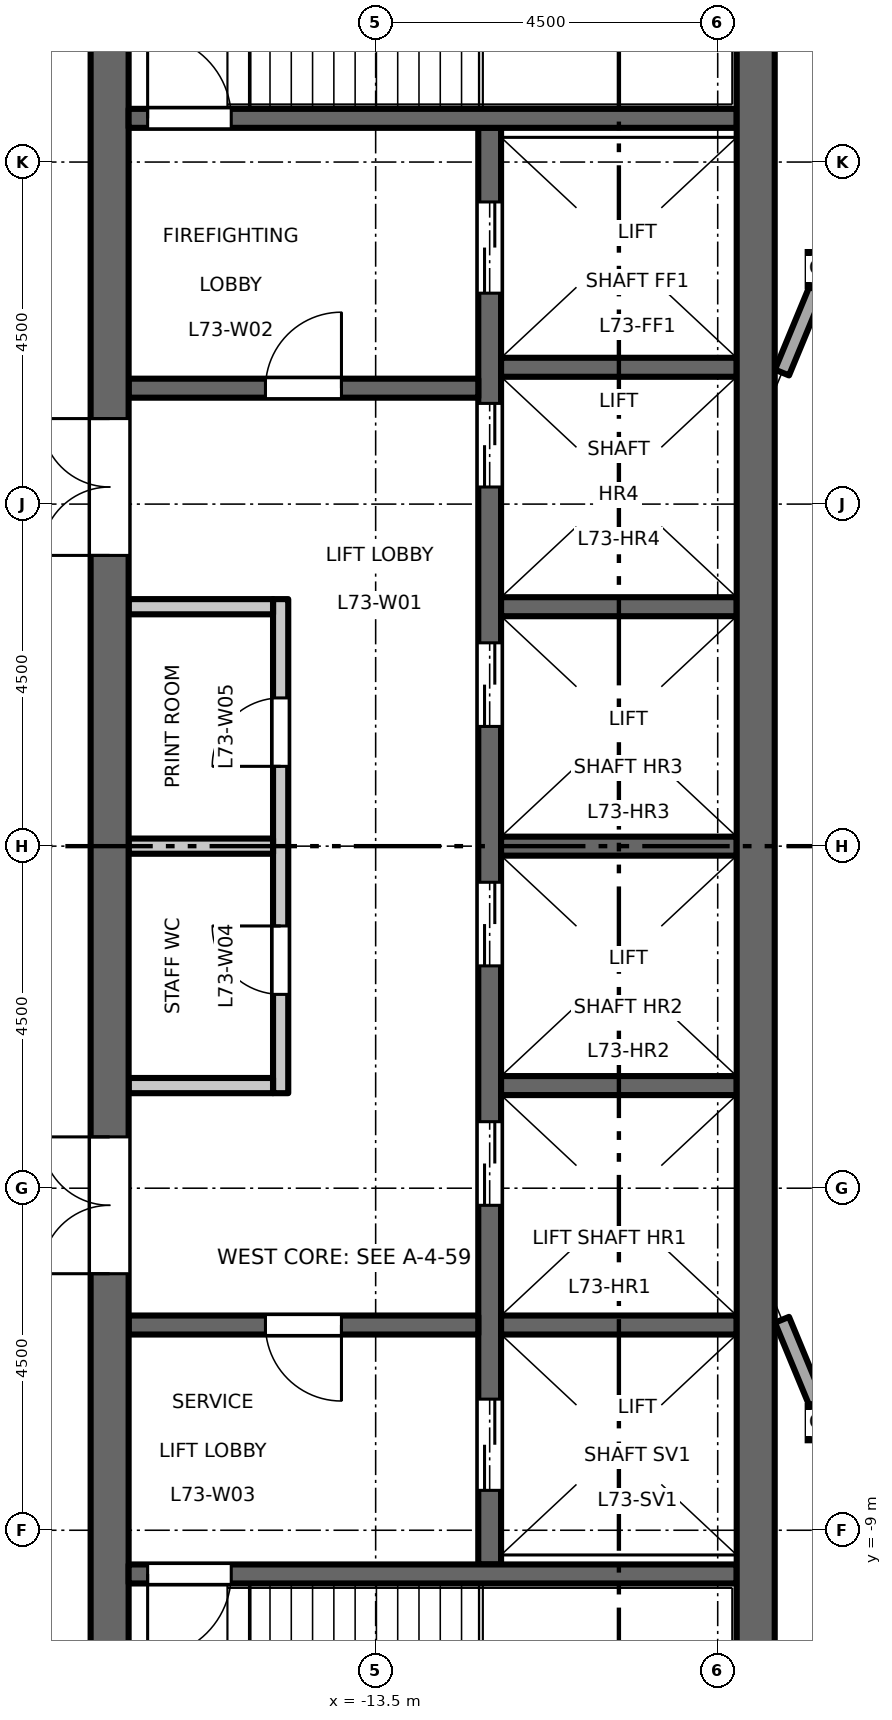
"""IFC4 building model, lengths in metres.
Left out: names, types, materials, properties, quantities, classifications, styles, units other than length and angle.
Written with IfcOpenShell. Run it as: python <this file> out.ifc"""

import sys

from ifc_helpers import new_model, si_unit, direction, frame, frame_2d, origin, origin_2d, place, context, subcontext, project, spatial, rectangle, hollow_rectangle, extrude, element, fill, save


model = new_model("IFC4")
c1 = context("Model", 3, precision=1e-05, world=origin(), true_north=direction((0.0, 1.0)))
c2 = subcontext(c1, "Body", "Model", "MODEL_VIEW")
j1 = project(units=[si_unit("LENGTHUNIT", "METRE"), si_unit("PLANEANGLEUNIT", "RADIAN")], contexts=[c1])
p1 = place(None, origin())
s1 = spatial("IfcSite", under=j1, at=p1, CompositionType="ELEMENT")
p2 = place(p1, origin())
s2 = spatial("IfcBuilding", under=s1, at=p2, CompositionType="ELEMENT")
p3 = place(p2, frame((0.0, 0.0, 339.2)))
s3 = spatial("IfcBuildingStorey", under=s2, at=p3, CompositionType="ELEMENT", Elevation=339.2)
for number, where, z_axis, x_axis in (
    (1, (-7.591, -7.591, 0.0), (0.0, 0.0, 1.0), (1.0, 0.0, 0.0)),
    (2, (-7.591, 7.591, 0.0), (0.0, 0.0, 1.0), (1.0, 0.0, 0.0)),
):
    element("IfcColumn", number, at=place(p3, frame(where, z_axis=z_axis, x_axis=x_axis)), inside=s3, PredefinedType="COLUMN", context=c2, shape_type="SweptSolid", body=[
        extrude(hollow_rectangle(XDim=0.45, YDim=0.45, WallThickness=0.022, at=origin_2d()), origin(), (0.0, 0.0, 1.0), 4.5),
    ])
p4 = place(p3, frame((-14.75, -3.25, 0.0), z_axis=(0.0, 0.0, 1.0), x_axis=(0.0, 1.0, 0.0)))
e3 = element("IfcWall", 3, at=p4, inside=s3, PredefinedType="PARTITIONING", context=c2, shape_type="SweptSolid", body=[
    extrude(rectangle(XDim=6.5, YDim=0.2, at=frame_2d((3.25, 0.0))), origin(), (0.0, 0.0, 1.0), 4.35),
])
p5 = place(p4, frame((1.3, 0.0, 0.0)))
e4 = element("IfcOpeningElement", 4, at=p5, cuts=e3, PredefinedType="OPENING", context=c2, shape_type="SweptSolid", body=[
    extrude(rectangle(XDim=0.9, YDim=2.1, at=frame_2d((0.45, 1.05))), frame((0.0, 0.11, 0.0), z_axis=(0.0, -1.0, 0.0), x_axis=(1.0, 0.0, 0.0)), (0.0, 0.0, 1.0), 0.22),
])
p6 = place(p4, frame((4.3, 0.0, 0.0)))
e5 = element("IfcOpeningElement", 5, at=p6, cuts=e3, PredefinedType="OPENING", context=c2, shape_type="SweptSolid", body=[
    extrude(rectangle(XDim=0.9, YDim=2.1, at=frame_2d((0.45, 1.05))), frame((0.0, 0.11, 0.0), z_axis=(0.0, -1.0, 0.0), x_axis=(1.0, 0.0, 0.0)), (0.0, 0.0, 1.0), 0.22),
])
for number, where, z_axis, x_axis in (
    (6, (-14.85, 3.15, 0.0), (0.0, 0.0, 1.0), (-1.0, 0.0, 0.0)),
    (7, (-14.85, -3.15, 0.0), (0.0, 0.0, 1.0), (-1.0, 0.0, 0.0)),
    (8, (-14.85, 0.0, 0.0), (0.0, 0.0, 1.0), (-1.0, 0.0, 0.0)),
):
    element("IfcWall", number, at=place(p3, frame(where, z_axis=z_axis, x_axis=x_axis)), inside=s3, PredefinedType="PARTITIONING", context=c2, shape_type="SweptSolid", body=[
        extrude(rectangle(XDim=1.9, YDim=0.2, at=frame_2d((0.95, 0.0))), origin(), (0.0, 0.0, 1.0), 4.35),
    ])
p7 = place(p3, frame((-12.0, -9.45, 0.0), z_axis=(0.0, 0.0, 1.0), x_axis=(0.0, 1.0, 0.0)))
e9 = element("IfcWall", 9, at=p7, inside=s3, PredefinedType="SHEAR", context=c2, shape_type="SweptSolid", body=[
    extrude(rectangle(XDim=18.9, YDim=0.3, at=frame_2d((9.45, 0.0))), origin(), (0.0, 0.0, 1.0), 4.35),
])
p8 = place(p7, frame((4.725, 0.0, 0.0)))
e10 = element("IfcOpeningElement", 10, at=p8, cuts=e9, PredefinedType="OPENING", context=c2, shape_type="SweptSolid", body=[
    extrude(rectangle(XDim=1.1, YDim=2.1, at=frame_2d((0.55, 1.05))), frame((0.0, 0.16, 0.0), z_axis=(0.0, -1.0, 0.0), x_axis=(1.0, 0.0, 0.0)), (0.0, 0.0, 1.0), 0.32),
])
p9 = place(p7, frame((7.875, 0.0, 0.0)))
e11 = element("IfcOpeningElement", 11, at=p9, cuts=e9, PredefinedType="OPENING", context=c2, shape_type="SweptSolid", body=[
    extrude(rectangle(XDim=1.1, YDim=2.1, at=frame_2d((0.55, 1.05))), frame((0.0, 0.16, 0.0), z_axis=(0.0, -1.0, 0.0), x_axis=(1.0, 0.0, 0.0)), (0.0, 0.0, 1.0), 0.32),
])
p10 = place(p7, frame((11.025, 0.0, 0.0)))
e12 = element("IfcOpeningElement", 12, at=p10, cuts=e9, PredefinedType="OPENING", context=c2, shape_type="SweptSolid", body=[
    extrude(rectangle(XDim=1.1, YDim=2.1, at=frame_2d((0.55, 1.05))), frame((0.0, 0.16, 0.0), z_axis=(0.0, -1.0, 0.0), x_axis=(1.0, 0.0, 0.0)), (0.0, 0.0, 1.0), 0.32),
])
p11 = place(p7, frame((14.175, 0.0, 0.0)))
e13 = element("IfcOpeningElement", 13, at=p11, cuts=e9, PredefinedType="OPENING", context=c2, shape_type="SweptSolid", body=[
    extrude(rectangle(XDim=1.1, YDim=2.1, at=frame_2d((0.55, 1.05))), frame((0.0, 0.16, 0.0), z_axis=(0.0, -1.0, 0.0), x_axis=(1.0, 0.0, 0.0)), (0.0, 0.0, 1.0), 0.32),
])
p12 = place(p7, frame((16.725, 0.0, 0.0)))
e14 = element("IfcOpeningElement", 14, at=p12, cuts=e9, PredefinedType="OPENING", context=c2, shape_type="SweptSolid", body=[
    extrude(rectangle(XDim=1.2, YDim=2.1, at=frame_2d((0.6, 1.05))), frame((0.0, 0.16, 0.0), z_axis=(0.0, -1.0, 0.0), x_axis=(1.0, 0.0, 0.0)), (0.0, 0.0, 1.0), 0.32),
])
p13 = place(p7, frame((0.975, 0.0, 0.0)))
e15 = element("IfcOpeningElement", 15, at=p13, cuts=e9, PredefinedType="OPENING", context=c2, shape_type="SweptSolid", body=[
    extrude(rectangle(XDim=1.2, YDim=2.1, at=frame_2d((0.6, 1.05))), frame((0.0, 0.16, 0.0), z_axis=(0.0, -1.0, 0.0), x_axis=(1.0, 0.0, 0.0)), (0.0, 0.0, 1.0), 0.32),
])
p14 = place(p3, frame((-12.15, 6.025, 0.0), z_axis=(0.0, 0.0, 1.0), x_axis=(-1.0, 0.0, 0.0)))
e16 = element("IfcWall", 16, at=p14, inside=s3, PredefinedType="SHEAR", context=c2, shape_type="SweptSolid", body=[
    extrude(rectangle(XDim=4.6, YDim=0.25, at=frame_2d((2.3, 0.0))), origin(), (0.0, 0.0, 1.0), 4.35),
])
p15 = place(p14, frame((1.8, 0.0, 0.0)))
e17 = element("IfcOpeningElement", 17, at=p15, cuts=e16, PredefinedType="OPENING", context=c2, shape_type="SweptSolid", body=[
    extrude(rectangle(XDim=1.0, YDim=2.1, at=frame_2d((0.5, 1.05))), frame((0.0, 0.135, 0.0), z_axis=(0.0, -1.0, 0.0), x_axis=(1.0, 0.0, 0.0)), (0.0, 0.0, 1.0), 0.27),
])
p16 = place(p3, frame((-12.15, -6.3, 0.0), z_axis=(0.0, 0.0, 1.0), x_axis=(-1.0, 0.0, 0.0)))
e18 = element("IfcWall", 18, at=p16, inside=s3, PredefinedType="SHEAR", context=c2, shape_type="SweptSolid", body=[
    extrude(rectangle(XDim=4.6, YDim=0.25, at=frame_2d((2.3, 0.0))), origin(), (0.0, 0.0, 1.0), 4.35),
])
p17 = place(p16, frame((1.8, 0.0, 0.0)))
e19 = element("IfcOpeningElement", 19, at=p17, cuts=e18, PredefinedType="OPENING", context=c2, shape_type="SweptSolid", body=[
    extrude(rectangle(XDim=1.0, YDim=2.1, at=frame_2d((0.5, 1.05))), frame((0.0, 0.135, 0.0), z_axis=(0.0, -1.0, 0.0), x_axis=(1.0, 0.0, 0.0)), (0.0, 0.0, 1.0), 0.27),
])
p18 = place(p3, frame((-17.0, -13.0, 0.0), z_axis=(0.0, 0.0, 1.0), x_axis=(0.0, 1.0, 0.0)))
e20 = element("IfcWall", 20, at=p18, inside=s3, PredefinedType="SHEAR", context=c2, shape_type="SweptSolid", body=[
    extrude(rectangle(XDim=26.0, YDim=0.5, at=frame_2d((13.0, 0.0))), origin(), (0.0, 0.0, 1.0), 4.35),
])
p19 = place(p18, frame((16.825, 0.0, 0.0)))
e21 = element("IfcOpeningElement", 21, at=p19, cuts=e20, PredefinedType="OPENING", context=c2, shape_type="SweptSolid", body=[
    extrude(rectangle(XDim=1.8, YDim=2.1, at=frame_2d((0.9, 1.05))), frame((0.0, 0.26, 0.0), z_axis=(0.0, -1.0, 0.0), x_axis=(1.0, 0.0, 0.0)), (0.0, 0.0, 1.0), 0.52),
])
p20 = place(p18, frame((7.375, 0.0, 0.0)))
e22 = element("IfcOpeningElement", 22, at=p20, cuts=e20, PredefinedType="OPENING", context=c2, shape_type="SweptSolid", body=[
    extrude(rectangle(XDim=1.8, YDim=2.1, at=frame_2d((0.9, 1.05))), frame((0.0, 0.26, 0.0), z_axis=(0.0, -1.0, 0.0), x_axis=(1.0, 0.0, 0.0)), (0.0, 0.0, 1.0), 0.52),
])
for number, where, z_axis, x_axis in (
    (23, (-8.75, 0.0, 0.0), (0.0, 0.0, 1.0), (-1.0, 0.0, 0.0)),
    (24, (-8.75, 3.15, 0.0), (0.0, 0.0, 1.0), (-1.0, 0.0, 0.0)),
    (25, (-8.75, 6.3, 0.0), (0.0, 0.0, 1.0), (-1.0, 0.0, 0.0)),
    (26, (-8.75, -3.15, 0.0), (0.0, 0.0, 1.0), (-1.0, 0.0, 0.0)),
    (27, (-8.75, -6.3, 0.0), (0.0, 0.0, 1.0), (-1.0, 0.0, 0.0)),
):
    element("IfcWall", number, at=place(p3, frame(where, z_axis=z_axis, x_axis=x_axis)), inside=s3, PredefinedType="SHEAR", context=c2, shape_type="SweptSolid", body=[
        extrude(rectangle(XDim=3.1, YDim=0.25, at=frame_2d((1.55, 0.0))), origin(), (0.0, 0.0, 1.0), 4.35),
    ])
p21 = place(p3, frame((-8.75, 9.575, 0.0), z_axis=(0.0, 0.0, 1.0), x_axis=(-1.0, 0.0, 0.0)))
e28 = element("IfcWall", 28, at=p21, inside=s3, PredefinedType="SHEAR", context=c2, shape_type="SweptSolid", body=[
    extrude(rectangle(XDim=8.0, YDim=0.25, at=frame_2d((4.0, 0.0))), origin(), (0.0, 0.0, 1.0), 4.35),
])
p22 = place(p21, frame((6.65, 0.0, 0.0)))
e29 = element("IfcOpeningElement", 29, at=p22, cuts=e28, PredefinedType="OPENING", context=c2, shape_type="SweptSolid", body=[
    extrude(rectangle(XDim=1.1, YDim=2.1, at=frame_2d((0.55, 1.05))), frame((0.0, 0.135, 0.0), z_axis=(0.0, -1.0, 0.0), x_axis=(1.0, 0.0, 0.0)), (0.0, 0.0, 1.0), 0.27),
])
p23 = place(p3, frame((-8.75, -9.575, 0.0), z_axis=(0.0, 0.0, 1.0), x_axis=(-1.0, 0.0, 0.0)))
e30 = element("IfcWall", 30, at=p23, inside=s3, PredefinedType="SHEAR", context=c2, shape_type="SweptSolid", body=[
    extrude(rectangle(XDim=8.0, YDim=0.25, at=frame_2d((4.0, 0.0))), origin(), (0.0, 0.0, 1.0), 4.35),
])
p24 = place(p23, frame((6.65, 0.0, 0.0)))
e31 = element("IfcOpeningElement", 31, at=p24, cuts=e30, PredefinedType="OPENING", context=c2, shape_type="SweptSolid", body=[
    extrude(rectangle(XDim=1.1, YDim=2.1, at=frame_2d((0.55, 1.05))), frame((0.0, 0.135, 0.0), z_axis=(0.0, -1.0, 0.0), x_axis=(1.0, 0.0, 0.0)), (0.0, 0.0, 1.0), 0.27),
])
p25 = place(p3, frame((-8.5, -13.0, 0.0), z_axis=(0.0, 0.0, 1.0), x_axis=(0.0, 1.0, 0.0)))
e32 = element("IfcWall", 32, at=p25, inside=s3, PredefinedType="SHEAR", context=c2, shape_type="SweptSolid", body=[
    extrude(rectangle(XDim=26.0, YDim=0.5, at=frame_2d((13.0, 0.0))), origin(), (0.0, 0.0, 1.0), 4.35),
])
for number, where, z_axis, x_axis in (
    (33, (-7.703, 7.319, 0.0), (0.0, 0.0, 1.0), (-0.383, -0.924, 0.0)),
    (34, (-8.154, -6.231, 0.0), (0.0, 0.0, 1.0), (0.383, -0.924, 0.0)),
):
    element("IfcWall", number, at=place(p3, frame(where, z_axis=z_axis, x_axis=x_axis)), inside=s3, PredefinedType="STANDARD", context=c2, shape_type="SweptSolid", body=[
        extrude(rectangle(XDim=1.178, YDim=0.2, at=frame_2d((0.589, 0.0))), origin(), (0.0, 0.0, 1.0), 4.01),
    ])
p26 = place(p15, origin())
e35 = element("IfcDoor", 35, at=p26, inside=s3, OperationType="SINGLE_SWING_LEFT", PredefinedType="DOOR", context=c2, shape_type="SweptSolid", body=[
    extrude(rectangle(XDim=1.0, YDim=2.1, at=frame_2d((0.5, 1.05))), frame((0.0, 0.025, 0.0), z_axis=(0.0, -1.0, 0.0), x_axis=(1.0, 0.0, 0.0)), (0.0, 0.0, 1.0), 0.05),
])
fill(e17, e35)
p27 = place(p17, origin())
e36 = element("IfcDoor", 36, at=p27, inside=s3, OperationType="SINGLE_SWING_RIGHT", PredefinedType="DOOR", context=c2, shape_type="SweptSolid", body=[
    extrude(rectangle(XDim=1.0, YDim=2.1, at=frame_2d((0.5, 1.05))), frame((0.0, 0.025, 0.0), z_axis=(0.0, -1.0, 0.0), x_axis=(1.0, 0.0, 0.0)), (0.0, 0.0, 1.0), 0.05),
])
fill(e19, e36)
p28 = place(p22, origin())
e37 = element("IfcDoor", 37, at=p28, inside=s3, OperationType="SINGLE_SWING_RIGHT", PredefinedType="DOOR", context=c2, shape_type="SweptSolid", body=[
    extrude(rectangle(XDim=1.1, YDim=2.1, at=frame_2d((0.55, 1.05))), frame((0.0, 0.025, 0.0), z_axis=(0.0, -1.0, 0.0), x_axis=(1.0, 0.0, 0.0)), (0.0, 0.0, 1.0), 0.05),
])
fill(e29, e37)
p29 = place(p24, origin())
e38 = element("IfcDoor", 38, at=p29, inside=s3, OperationType="SINGLE_SWING_LEFT", PredefinedType="DOOR", context=c2, shape_type="SweptSolid", body=[
    extrude(rectangle(XDim=1.1, YDim=2.1, at=frame_2d((0.55, 1.05))), frame((0.0, 0.025, 0.0), z_axis=(0.0, -1.0, 0.0), x_axis=(1.0, 0.0, 0.0)), (0.0, 0.0, 1.0), 0.05),
])
fill(e31, e38)
p30 = place(p19, origin())
e39 = element("IfcDoor", 39, at=p30, inside=s3, OperationType="DOUBLE_DOOR_DOUBLE_SWING", PredefinedType="DOOR", context=c2, shape_type="SweptSolid", body=[
    extrude(rectangle(XDim=1.8, YDim=2.1, at=frame_2d((0.9, 1.05))), frame((0.0, 0.025, 0.0), z_axis=(0.0, -1.0, 0.0), x_axis=(1.0, 0.0, 0.0)), (0.0, 0.0, 1.0), 0.05),
])
fill(e21, e39)
p31 = place(p20, origin())
e40 = element("IfcDoor", 40, at=p31, inside=s3, OperationType="DOUBLE_DOOR_DOUBLE_SWING", PredefinedType="DOOR", context=c2, shape_type="SweptSolid", body=[
    extrude(rectangle(XDim=1.8, YDim=2.1, at=frame_2d((0.9, 1.05))), frame((0.0, 0.025, 0.0), z_axis=(0.0, -1.0, 0.0), x_axis=(1.0, 0.0, 0.0)), (0.0, 0.0, 1.0), 0.05),
])
fill(e22, e40)
p32 = place(p8, origin())
e41 = element("IfcDoor", 41, at=p32, inside=s3, OperationType="DOUBLE_DOOR_SLIDING", PredefinedType="DOOR", context=c2, shape_type="SweptSolid", body=[
    extrude(rectangle(XDim=1.1, YDim=2.1, at=frame_2d((0.55, 1.05))), frame((0.0, 0.025, 0.0), z_axis=(0.0, -1.0, 0.0), x_axis=(1.0, 0.0, 0.0)), (0.0, 0.0, 1.0), 0.05),
])
fill(e10, e41)
p33 = place(p9, origin())
e42 = element("IfcDoor", 42, at=p33, inside=s3, OperationType="DOUBLE_DOOR_SLIDING", PredefinedType="DOOR", context=c2, shape_type="SweptSolid", body=[
    extrude(rectangle(XDim=1.1, YDim=2.1, at=frame_2d((0.55, 1.05))), frame((0.0, 0.025, 0.0), z_axis=(0.0, -1.0, 0.0), x_axis=(1.0, 0.0, 0.0)), (0.0, 0.0, 1.0), 0.05),
])
fill(e11, e42)
p34 = place(p10, origin())
e43 = element("IfcDoor", 43, at=p34, inside=s3, OperationType="DOUBLE_DOOR_SLIDING", PredefinedType="DOOR", context=c2, shape_type="SweptSolid", body=[
    extrude(rectangle(XDim=1.1, YDim=2.1, at=frame_2d((0.55, 1.05))), frame((0.0, 0.025, 0.0), z_axis=(0.0, -1.0, 0.0), x_axis=(1.0, 0.0, 0.0)), (0.0, 0.0, 1.0), 0.05),
])
fill(e12, e43)
p35 = place(p11, origin())
e44 = element("IfcDoor", 44, at=p35, inside=s3, OperationType="DOUBLE_DOOR_SLIDING", PredefinedType="DOOR", context=c2, shape_type="SweptSolid", body=[
    extrude(rectangle(XDim=1.1, YDim=2.1, at=frame_2d((0.55, 1.05))), frame((0.0, 0.025, 0.0), z_axis=(0.0, -1.0, 0.0), x_axis=(1.0, 0.0, 0.0)), (0.0, 0.0, 1.0), 0.05),
])
fill(e13, e44)
p36 = place(p12, origin())
e45 = element("IfcDoor", 45, at=p36, inside=s3, OperationType="DOUBLE_DOOR_SLIDING", PredefinedType="DOOR", context=c2, shape_type="SweptSolid", body=[
    extrude(rectangle(XDim=1.2, YDim=2.1, at=frame_2d((0.6, 1.05))), frame((0.0, 0.025, 0.0), z_axis=(0.0, -1.0, 0.0), x_axis=(1.0, 0.0, 0.0)), (0.0, 0.0, 1.0), 0.05),
])
fill(e14, e45)
p37 = place(p13, origin())
e46 = element("IfcDoor", 46, at=p37, inside=s3, OperationType="DOUBLE_DOOR_SLIDING", PredefinedType="DOOR", context=c2, shape_type="SweptSolid", body=[
    extrude(rectangle(XDim=1.2, YDim=2.1, at=frame_2d((0.6, 1.05))), frame((0.0, 0.025, 0.0), z_axis=(0.0, -1.0, 0.0), x_axis=(1.0, 0.0, 0.0)), (0.0, 0.0, 1.0), 0.05),
])
fill(e15, e46)
p38 = place(p5, origin())
e47 = element("IfcDoor", 47, at=p38, inside=s3, OperationType="SINGLE_SWING_LEFT", PredefinedType="DOOR", context=c2, shape_type="SweptSolid", body=[
    extrude(rectangle(XDim=0.9, YDim=2.1, at=frame_2d((0.45, 1.05))), frame((0.0, 0.025, 0.0), z_axis=(0.0, -1.0, 0.0), x_axis=(1.0, 0.0, 0.0)), (0.0, 0.0, 1.0), 0.05),
])
fill(e4, e47)
p39 = place(p6, origin())
e48 = element("IfcDoor", 48, at=p39, inside=s3, OperationType="SINGLE_SWING_RIGHT", PredefinedType="DOOR", context=c2, shape_type="SweptSolid", body=[
    extrude(rectangle(XDim=0.9, YDim=2.1, at=frame_2d((0.45, 1.05))), frame((0.0, 0.025, 0.0), z_axis=(0.0, -1.0, 0.0), x_axis=(1.0, 0.0, 0.0)), (0.0, 0.0, 1.0), 0.05),
])
fill(e5, e48)
save(model, sys.argv[1])
